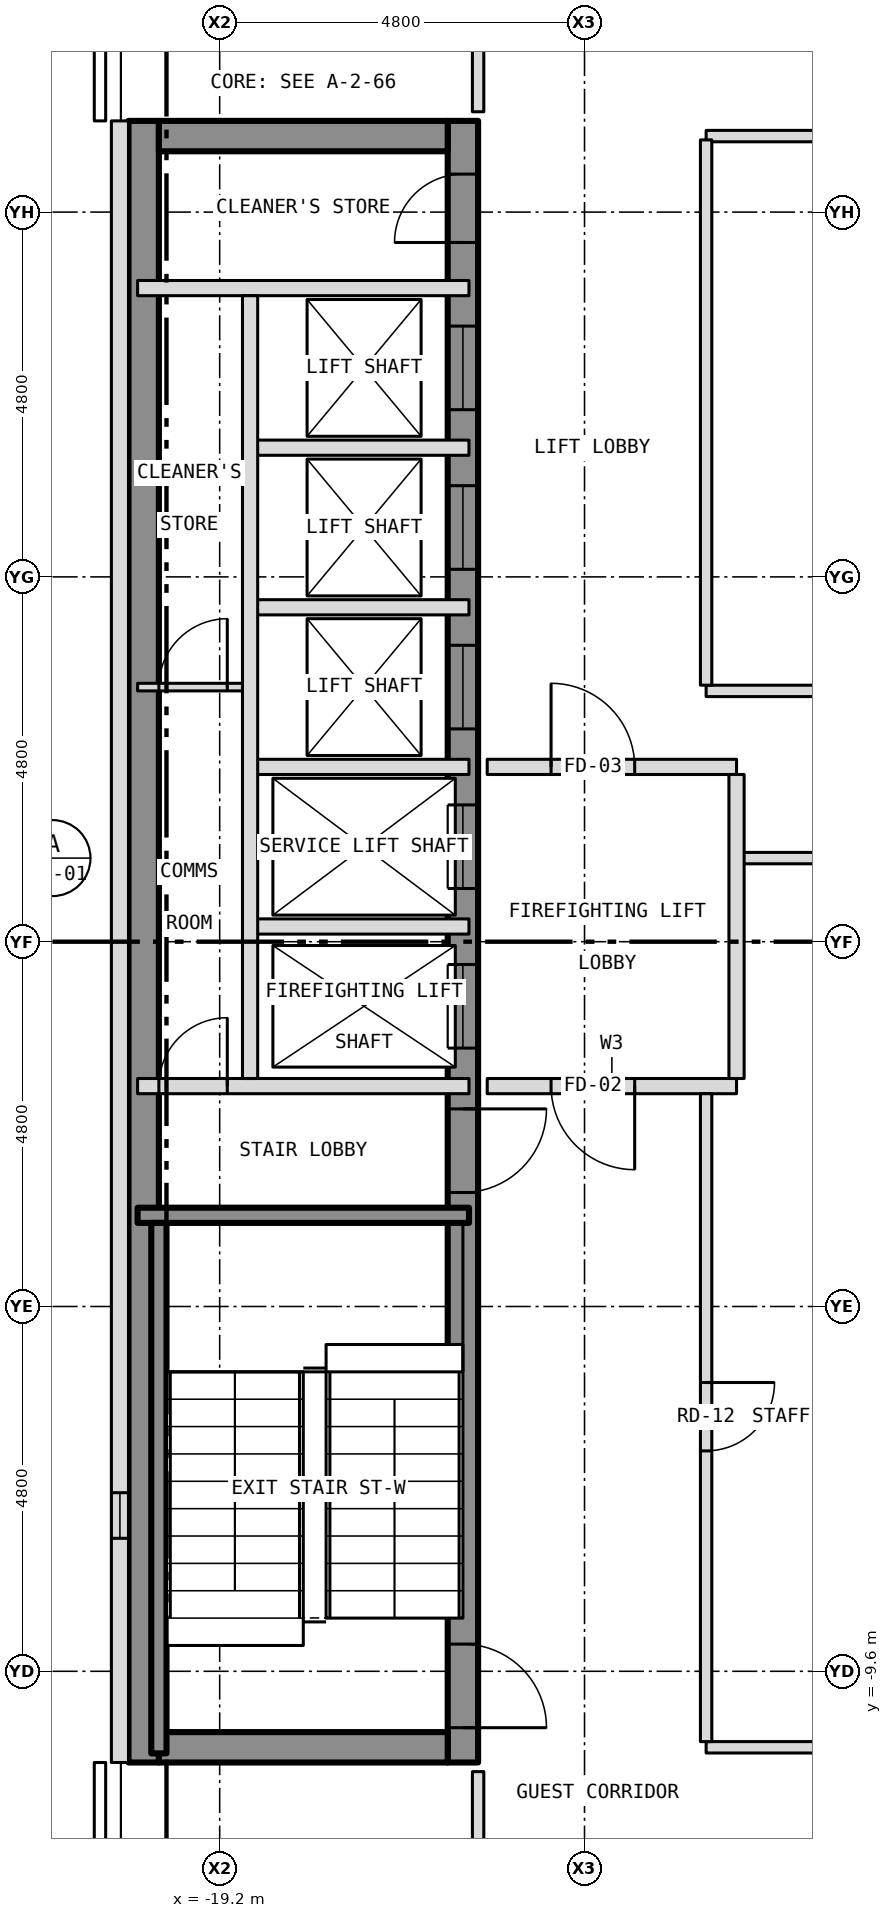
"""IFC4 building model, lengths in metres.
Left out: names, types, materials, properties, quantities, classifications, styles, units other than length and angle.
Written with IfcOpenShell. Run it as: python <this file> out.ifc"""

import sys

from ifc_helpers import new_model, si_unit, direction, frame, frame_2d, origin, place, context, subcontext, project, spatial, rectangle, extrude, element, fill, save


model = new_model("IFC4")
c1 = context("Model", 3, precision=1e-05, world=origin(), true_north=direction((0.0, 1.0)))
c2 = subcontext(c1, "Body", "Model", "MODEL_VIEW")
j1 = project(units=[si_unit("LENGTHUNIT", "METRE"), si_unit("PLANEANGLEUNIT", "RADIAN")], contexts=[c1])
p1 = place(None, origin())
s1 = spatial("IfcSite", under=j1, at=p1, CompositionType="ELEMENT")
p2 = place(p1, origin())
s2 = spatial("IfcBuilding", under=s1, at=p2, CompositionType="ELEMENT")
p3 = place(p2, frame((0.0, 0.0, 241.0)))
s3 = spatial("IfcBuildingStorey", under=s2, at=p3, CompositionType="ELEMENT", Elevation=241.0)
p4 = place(p3, frame((-16.0, -10.8, 0.0), z_axis=(0.0, 0.0, 1.0), x_axis=(0.0, 1.0, 0.0)))
e1 = element("IfcWall", 1, at=p4, inside=s3, PredefinedType="SHEAR", context=c2, shape_type="SweptSolid", body=[
    extrude(rectangle(XDim=21.6, YDim=0.4, at=frame_2d((10.8, 0.0))), origin(), (0.0, 0.0, 1.0), 3.25),
])
p5 = place(p4, frame((9.4, 0.0, 0.0)))
e2 = element("IfcOpeningElement", 2, at=p5, cuts=e1, PredefinedType="OPENING", context=c2, shape_type="SweptSolid", body=[
    extrude(rectangle(XDim=1.1, YDim=2.1, at=frame_2d((0.55, 1.05))), frame((0.0, 0.212, 0.0), z_axis=(0.0, -1.0, 0.0), x_axis=(1.0, 0.0, 0.0)), (0.0, 0.0, 1.0), 0.424),
])
p6 = place(p4, frame((11.5, 0.0, 0.0)))
e3 = element("IfcOpeningElement", 3, at=p6, cuts=e1, PredefinedType="OPENING", context=c2, shape_type="SweptSolid", body=[
    extrude(rectangle(XDim=1.1, YDim=2.1, at=frame_2d((0.55, 1.05))), frame((0.0, 0.212, 0.0), z_axis=(0.0, -1.0, 0.0), x_axis=(1.0, 0.0, 0.0)), (0.0, 0.0, 1.0), 0.424),
])
p7 = place(p4, frame((13.6, 0.0, 0.0)))
e4 = element("IfcOpeningElement", 4, at=p7, cuts=e1, PredefinedType="OPENING", context=c2, shape_type="SweptSolid", body=[
    extrude(rectangle(XDim=1.1, YDim=2.1, at=frame_2d((0.55, 1.05))), frame((0.0, 0.212, 0.0), z_axis=(0.0, -1.0, 0.0), x_axis=(1.0, 0.0, 0.0)), (0.0, 0.0, 1.0), 0.424),
])
p8 = place(p4, frame((15.7, 0.0, 0.0)))
e5 = element("IfcOpeningElement", 5, at=p8, cuts=e1, PredefinedType="OPENING", context=c2, shape_type="SweptSolid", body=[
    extrude(rectangle(XDim=1.1, YDim=2.1, at=frame_2d((0.55, 1.05))), frame((0.0, 0.212, 0.0), z_axis=(0.0, -1.0, 0.0), x_axis=(1.0, 0.0, 0.0)), (0.0, 0.0, 1.0), 0.424),
])
p9 = place(p4, frame((17.8, 0.0, 0.0)))
e6 = element("IfcOpeningElement", 6, at=p9, cuts=e1, PredefinedType="OPENING", context=c2, shape_type="SweptSolid", body=[
    extrude(rectangle(XDim=1.1, YDim=2.1, at=frame_2d((0.55, 1.05))), frame((0.0, 0.212, 0.0), z_axis=(0.0, -1.0, 0.0), x_axis=(1.0, 0.0, 0.0)), (0.0, 0.0, 1.0), 0.424),
])
p10 = place(p4, frame((0.458, 0.0, 0.0)))
e7 = element("IfcOpeningElement", 7, at=p10, cuts=e1, PredefinedType="OPENING", context=c2, shape_type="SweptSolid", body=[
    extrude(rectangle(XDim=1.1, YDim=2.1, at=frame_2d((0.55, 1.05))), frame((0.0, 0.212, 0.0), z_axis=(0.0, -1.0, 0.0), x_axis=(1.0, 0.0, 0.0)), (0.0, 0.0, 1.0), 0.424),
])
p11 = place(p4, frame((7.5, 0.0, 0.0)))
e8 = element("IfcOpeningElement", 8, at=p11, cuts=e1, PredefinedType="OPENING", context=c2, shape_type="SweptSolid", body=[
    extrude(rectangle(XDim=1.1, YDim=2.1, at=frame_2d((0.55, 1.05))), frame((0.0, 0.212, 0.0), z_axis=(0.0, -1.0, 0.0), x_axis=(1.0, 0.0, 0.0)), (0.0, 0.0, 1.0), 0.424),
])
p12 = place(p4, frame((20.0, 0.0, 0.0)))
e9 = element("IfcOpeningElement", 9, at=p12, cuts=e1, PredefinedType="OPENING", context=c2, shape_type="SweptSolid", body=[
    extrude(rectangle(XDim=0.9, YDim=2.1, at=frame_2d((0.45, 1.05))), frame((0.0, 0.212, 0.0), z_axis=(0.0, -1.0, 0.0), x_axis=(1.0, 0.0, 0.0)), (0.0, 0.0, 1.0), 0.424),
])
p13 = place(p3, frame((-20.2, -10.8, 0.0), z_axis=(0.0, 0.0, 1.0), x_axis=(0.0, 1.0, 0.0)))
e10 = element("IfcWall", 10, at=p13, inside=s3, PredefinedType="SHEAR", context=c2, shape_type="SweptSolid", body=[
    extrude(rectangle(XDim=21.6, YDim=0.4, at=frame_2d((10.8, 0.0))), origin(), (0.0, 0.0, 1.0), 3.25),
])
for number, where, z_axis, x_axis in (
    (11, (-20.0, 10.6, 0.0), (0.0, 0.0, 1.0), (1.0, 0.0, 0.0)),
    (12, (-20.0, -10.6, 0.0), (0.0, 0.0, 1.0), (1.0, 0.0, 0.0)),
):
    element("IfcWall", number, at=place(p3, frame(where, z_axis=z_axis, x_axis=x_axis)), inside=s3, PredefinedType="SHEAR", context=c2, shape_type="SweptSolid", body=[
        extrude(rectangle(XDim=3.8, YDim=0.4, at=frame_2d((1.9, 0.0))), origin(), (0.0, 0.0, 1.0), 3.25),
    ])
p14 = place(p3, frame((-20.512, 10.8, 0.0), z_axis=(0.0, 0.0, 1.0), x_axis=(0.0, -1.0, 0.0)))
e13 = element("IfcWall", 13, at=p14, inside=s3, PredefinedType="SOLIDWALL", context=c2, shape_type="SweptSolid", body=[
    extrude(rectangle(XDim=21.6, YDim=0.225, at=frame_2d((10.8, 0.0))), origin(), (0.0, 0.0, 1.0), 3.5),
])
p15 = place(p14, frame((18.05, 0.0, 1.0)))
e14 = element("IfcOpeningElement", 14, at=p15, cuts=e13, PredefinedType="OPENING", context=c2, shape_type="SweptSolid", body=[
    extrude(rectangle(XDim=0.6, YDim=1.5, at=frame_2d((0.3, 0.75))), frame((0.0, 0.125, 0.0), z_axis=(0.0, -1.0, 0.0), x_axis=(1.0, 0.0, 0.0)), (0.0, 0.0, 1.0), 0.249),
])
p16 = place(p3, frame((-12.8, -10.6, 0.0), z_axis=(0.0, 0.0, 1.0), x_axis=(1.0, 0.0, 0.0)))
e15 = element("IfcWall", 15, at=p16, inside=s3, PredefinedType="PARTITIONING", context=c2, shape_type="SweptSolid", body=[
    extrude(rectangle(XDim=20.3, YDim=0.15, at=frame_2d((10.15, 0.0))), origin(), (0.0, 0.0, 1.0), 3.35),
])
p17 = place(p16, frame((11.3, 0.0, 0.0)))
e16 = element("IfcOpeningElement", 16, at=p17, cuts=e15, PredefinedType="OPENING", context=c2, shape_type="SweptSolid", body=[
    extrude(rectangle(XDim=0.9, YDim=2.1, at=frame_2d((0.45, 1.05))), frame((0.0, 0.087, 0.0), z_axis=(0.0, -1.0, 0.0), x_axis=(1.0, 0.0, 0.0)), (0.0, 0.0, 1.0), 0.174),
])
p18 = place(p3, frame((-20.28, -3.6, 0.0), z_axis=(0.0, 0.0, 1.0), x_axis=(1.0, 0.0, 0.0)))
e17 = element("IfcWall", 17, at=p18, inside=s3, PredefinedType="SHEAR", context=c2, shape_type="SweptSolid", body=[
    extrude(rectangle(XDim=4.36, YDim=0.2, at=frame_2d((2.18, 0.0))), origin(), (0.0, 0.0, 1.0), 3.25),
])
p19 = place(p3, frame((-20.28, -1.9, 0.0), z_axis=(0.0, 0.0, 1.0), x_axis=(1.0, 0.0, 0.0)))
e18 = element("IfcWall", 18, at=p19, inside=s3, PredefinedType="PARTITIONING", context=c2, shape_type="SweptSolid", body=[
    extrude(rectangle(XDim=4.36, YDim=0.2, at=frame_2d((2.18, 0.0))), origin(), (0.0, 0.0, 1.0), 3.25),
])
p20 = place(p19, frame((0.28, 0.0, 0.0)))
e19 = element("IfcOpeningElement", 19, at=p20, cuts=e18, PredefinedType="OPENING", context=c2, shape_type="SweptSolid", body=[
    extrude(rectangle(XDim=0.9, YDim=2.1, at=frame_2d((0.45, 1.05))), frame((0.0, 0.112, 0.0), z_axis=(0.0, -1.0, 0.0), x_axis=(1.0, 0.0, 0.0)), (0.0, 0.0, 1.0), 0.224),
])
p21 = place(p3, frame((-15.68, -1.9, 0.0), z_axis=(0.0, 0.0, 1.0), x_axis=(1.0, 0.0, 0.0)))
e20 = element("IfcWall", 20, at=p21, inside=s3, PredefinedType="PARTITIONING", context=c2, shape_type="SweptSolid", body=[
    extrude(rectangle(XDim=3.28, YDim=0.2, at=frame_2d((1.64, 0.0))), origin(), (0.0, 0.0, 1.0), 3.35),
])
p22 = place(p21, frame((0.84, 0.0, 0.0)))
e21 = element("IfcOpeningElement", 21, at=p22, cuts=e20, PredefinedType="OPENING", context=c2, shape_type="SweptSolid", body=[
    extrude(rectangle(XDim=1.1, YDim=2.1, at=frame_2d((0.55, 1.05))), frame((0.0, 0.112, 0.0), z_axis=(0.0, -1.0, 0.0), x_axis=(1.0, 0.0, 0.0)), (0.0, 0.0, 1.0), 0.224),
])
p23 = place(p3, frame((-18.8, 0.2, 0.0), z_axis=(0.0, 0.0, 1.0), x_axis=(1.0, 0.0, 0.0)))
e22 = element("IfcWall", 22, at=p23, inside=s3, PredefinedType="PARTITIONING", context=c2, shape_type="SweptSolid", body=[
    extrude(rectangle(XDim=2.88, YDim=0.2, at=frame_2d((1.44, 0.0))), origin(), (0.0, 0.0, 1.0), 3.25),
])
p24 = place(p3, frame((-12.4, 1.1, 0.0), z_axis=(0.0, 0.0, 1.0), x_axis=(1.0, 0.0, 0.0)))
e23 = element("IfcWall", 23, at=p24, inside=s3, PredefinedType="PARTITIONING", context=c2, shape_type="SweptSolid", body=[
    extrude(rectangle(XDim=19.9, YDim=0.15, at=frame_2d((9.95, 0.0))), origin(), (0.0, 0.0, 1.0), 3.35),
])
p25 = place(p3, frame((-18.8, 2.3, 0.0), z_axis=(0.0, 0.0, 1.0), x_axis=(1.0, 0.0, 0.0)))
e24 = element("IfcWall", 24, at=p25, inside=s3, PredefinedType="PARTITIONING", context=c2, shape_type="SweptSolid", body=[
    extrude(rectangle(XDim=2.88, YDim=0.2, at=frame_2d((1.44, 0.0))), origin(), (0.0, 0.0, 1.0), 3.25),
])
p26 = place(p3, frame((-15.68, 2.3, 0.0), z_axis=(0.0, 0.0, 1.0), x_axis=(1.0, 0.0, 0.0)))
e25 = element("IfcWall", 25, at=p26, inside=s3, PredefinedType="PARTITIONING", context=c2, shape_type="SweptSolid", body=[
    extrude(rectangle(XDim=3.28, YDim=0.2, at=frame_2d((1.64, 0.0))), origin(), (0.0, 0.0, 1.0), 3.35),
])
p27 = place(p26, frame((0.84, 0.0, 0.0)))
e26 = element("IfcOpeningElement", 26, at=p27, cuts=e25, PredefinedType="OPENING", context=c2, shape_type="SweptSolid", body=[
    extrude(rectangle(XDim=1.1, YDim=2.1, at=frame_2d((0.55, 1.05))), frame((0.0, 0.112, 0.0), z_axis=(0.0, -1.0, 0.0), x_axis=(1.0, 0.0, 0.0)), (0.0, 0.0, 1.0), 0.224),
])
p28 = place(p3, frame((-12.8, 3.3, 0.0), z_axis=(0.0, 0.0, 1.0), x_axis=(1.0, 0.0, 0.0)))
e27 = element("IfcWall", 27, at=p28, inside=s3, PredefinedType="PARTITIONING", context=c2, shape_type="SweptSolid", body=[
    extrude(rectangle(XDim=20.3, YDim=0.15, at=frame_2d((10.15, 0.0))), origin(), (0.0, 0.0, 1.0), 3.35),
])
p29 = place(p28, frame((16.1, 0.0, 0.0)))
e28 = element("IfcOpeningElement", 28, at=p29, cuts=e27, PredefinedType="OPENING", context=c2, shape_type="SweptSolid", body=[
    extrude(rectangle(XDim=0.9, YDim=2.1, at=frame_2d((0.45, 1.05))), frame((0.0, 0.087, 0.0), z_axis=(0.0, -1.0, 0.0), x_axis=(1.0, 0.0, 0.0)), (0.0, 0.0, 1.0), 0.174),
])
p30 = place(p3, frame((-20.28, 3.35, 0.0), z_axis=(0.0, 0.0, 1.0), x_axis=(1.0, 0.0, 0.0)))
e29 = element("IfcWall", 29, at=p30, inside=s3, PredefinedType="PARTITIONING", context=c2, shape_type="SweptSolid", body=[
    extrude(rectangle(XDim=1.48, YDim=0.1, at=frame_2d((0.74, 0.0))), origin(), (0.0, 0.0, 1.0), 3.25),
])
p31 = place(p30, frame((0.28, 0.0, 0.0)))
e30 = element("IfcOpeningElement", 30, at=p31, cuts=e29, PredefinedType="OPENING", context=c2, shape_type="SweptSolid", body=[
    extrude(rectangle(XDim=0.9, YDim=2.1, at=frame_2d((0.45, 1.05))), frame((0.0, 0.062, 0.0), z_axis=(0.0, -1.0, 0.0), x_axis=(1.0, 0.0, 0.0)), (0.0, 0.0, 1.0), 0.124),
])
for number, where, z_axis, x_axis in (
    (31, (-18.8, 4.4, 0.0), (0.0, 0.0, 1.0), (1.0, 0.0, 0.0)),
    (32, (-18.8, 6.5, 0.0), (0.0, 0.0, 1.0), (1.0, 0.0, 0.0)),
):
    element("IfcWall", number, at=place(p3, frame(where, z_axis=z_axis, x_axis=x_axis)), inside=s3, PredefinedType="PARTITIONING", context=c2, shape_type="SweptSolid", body=[
        extrude(rectangle(XDim=2.88, YDim=0.2, at=frame_2d((1.44, 0.0))), origin(), (0.0, 0.0, 1.0), 3.25),
    ])
p32 = place(p3, frame((-20.28, 8.6, 0.0), z_axis=(0.0, 0.0, 1.0), x_axis=(1.0, 0.0, 0.0)))
e33 = element("IfcWall", 33, at=p32, inside=s3, PredefinedType="PARTITIONING", context=c2, shape_type="SweptSolid", body=[
    extrude(rectangle(XDim=4.36, YDim=0.2, at=frame_2d((2.18, 0.0))), origin(), (0.0, 0.0, 1.0), 3.25),
])
p33 = place(p3, frame((-12.8, 10.6, 0.0), z_axis=(0.0, 0.0, 1.0), x_axis=(1.0, 0.0, 0.0)))
e34 = element("IfcWall", 34, at=p33, inside=s3, PredefinedType="PARTITIONING", context=c2, shape_type="SweptSolid", body=[
    extrude(rectangle(XDim=20.3, YDim=0.15, at=frame_2d((10.15, 0.0))), origin(), (0.0, 0.0, 1.0), 3.35),
])
p34 = place(p33, frame((5.95, 0.0, 0.0)))
e35 = element("IfcOpeningElement", 35, at=p34, cuts=e34, PredefinedType="OPENING", context=c2, shape_type="SweptSolid", body=[
    extrude(rectangle(XDim=0.9, YDim=2.1, at=frame_2d((0.45, 1.05))), frame((0.0, 0.087, 0.0), z_axis=(0.0, -1.0, 0.0), x_axis=(1.0, 0.0, 0.0)), (0.0, 0.0, 1.0), 0.174),
])
p35 = place(p3, frame((-20.0, -10.68, 0.0), z_axis=(0.0, 0.0, 1.0), x_axis=(0.0, 1.0, 0.0)))
e36 = element("IfcWall", 36, at=p35, inside=s3, PredefinedType="SHEAR", context=c2, shape_type="SweptSolid", body=[
    extrude(rectangle(XDim=6.98, YDim=0.2, at=frame_2d((3.49, 0.0))), origin(), (0.0, 0.0, 1.0), 3.25),
])
p36 = place(p3, frame((-18.8, -1.8, 0.0), z_axis=(0.0, 0.0, 1.0), x_axis=(0.0, 1.0, 0.0)))
e37 = element("IfcWall", 37, at=p36, inside=s3, PredefinedType="PARTITIONING", context=c2, shape_type="SweptSolid", body=[
    extrude(rectangle(XDim=10.3, YDim=0.2, at=frame_2d((5.15, 0.0))), origin(), (0.0, 0.0, 1.0), 3.25),
])
for number, where, z_axis, x_axis in (
    (38, (-15.8, -12.725, 0.0), (0.0, 0.0, 1.0), (0.0, 1.0, 0.0)),
    (39, (-15.8, 10.92, 0.0), (0.0, 0.0, 1.0), (0.0, 1.0, 0.0)),
):
    element("IfcWall", number, at=place(p3, frame(where, z_axis=z_axis, x_axis=x_axis)), inside=s3, PredefinedType="PARTITIONING", context=c2, shape_type="SweptSolid", body=[
        extrude(rectangle(XDim=1.805, YDim=0.15, at=frame_2d((0.903, 0.0))), origin(), (0.0, 0.0, 1.0), 3.35),
    ])
p37 = place(p3, frame((-12.8, -10.525, 0.0), z_axis=(0.0, 0.0, 1.0), x_axis=(0.0, 1.0, 0.0)))
e40 = element("IfcWall", 40, at=p37, inside=s3, PredefinedType="PARTITIONING", context=c2, shape_type="SweptSolid", body=[
    extrude(rectangle(XDim=8.525, YDim=0.15, at=frame_2d((4.262, 0.0))), origin(), (0.0, 0.0, 1.0), 3.35),
])
p38 = place(p37, frame((3.825, 0.0, 0.0)))
e41 = element("IfcOpeningElement", 41, at=p38, cuts=e40, PredefinedType="OPENING", context=c2, shape_type="SweptSolid", body=[
    extrude(rectangle(XDim=0.9, YDim=2.1, at=frame_2d((0.45, 1.05))), frame((0.0, 0.087, 0.0), z_axis=(0.0, -1.0, 0.0), x_axis=(1.0, 0.0, 0.0)), (0.0, 0.0, 1.0), 0.174),
])
p39 = place(p3, frame((-12.8, 3.375, 0.0), z_axis=(0.0, 0.0, 1.0), x_axis=(0.0, 1.0, 0.0)))
e42 = element("IfcWall", 42, at=p39, inside=s3, PredefinedType="PARTITIONING", context=c2, shape_type="SweptSolid", body=[
    extrude(rectangle(XDim=7.175, YDim=0.15, at=frame_2d((3.587, 0.0))), origin(), (0.0, 0.0, 1.0), 3.35),
])
p40 = place(p3, frame((-12.4, -1.8, 0.0), z_axis=(0.0, 0.0, 1.0), x_axis=(0.0, 1.0, 0.0)))
e43 = element("IfcWall", 43, at=p40, inside=s3, PredefinedType="PARTITIONING", context=c2, shape_type="SweptSolid", body=[
    extrude(rectangle(XDim=4.0, YDim=0.2, at=frame_2d((2.0, 0.0))), origin(), (0.0, 0.0, 1.0), 3.35),
])
p41 = place(p15, origin())
e44 = element("IfcWindow", 44, at=p41, inside=s3, PartitioningType="SINGLE_PANEL", PredefinedType="WINDOW", context=c2, shape_type="SweptSolid", body=[
    extrude(rectangle(XDim=0.6, YDim=1.5, at=frame_2d((0.3, 0.75))), frame((0.0, -0.022, 0.0), z_axis=(0.0, -1.0, 0.0), x_axis=(1.0, 0.0, 0.0)), (0.0, 0.0, 1.0), 0.06),
])
fill(e14, e44)
p42 = place(p5, origin())
e45 = element("IfcDoor", 45, at=p42, inside=s3, OperationType="SLIDING_TO_LEFT", PredefinedType="DOOR", context=c2, shape_type="SweptSolid", body=[
    extrude(rectangle(XDim=1.1, YDim=2.1, at=frame_2d((0.55, 1.05))), frame((0.0, 0.025, 0.0), z_axis=(0.0, -1.0, 0.0), x_axis=(1.0, 0.0, 0.0)), (0.0, 0.0, 1.0), 0.05),
])
fill(e2, e45)
p43 = place(p6, origin())
e46 = element("IfcDoor", 46, at=p43, inside=s3, OperationType="SLIDING_TO_LEFT", PredefinedType="DOOR", context=c2, shape_type="SweptSolid", body=[
    extrude(rectangle(XDim=1.1, YDim=2.1, at=frame_2d((0.55, 1.05))), frame((0.0, 0.025, 0.0), z_axis=(0.0, -1.0, 0.0), x_axis=(1.0, 0.0, 0.0)), (0.0, 0.0, 1.0), 0.05),
])
fill(e3, e46)
p44 = place(p7, origin())
e47 = element("IfcDoor", 47, at=p44, inside=s3, OperationType="SLIDING_TO_LEFT", PredefinedType="DOOR", context=c2, shape_type="SweptSolid", body=[
    extrude(rectangle(XDim=1.1, YDim=2.1, at=frame_2d((0.55, 1.05))), frame((0.0, 0.025, 0.0), z_axis=(0.0, -1.0, 0.0), x_axis=(1.0, 0.0, 0.0)), (0.0, 0.0, 1.0), 0.05),
])
fill(e4, e47)
p45 = place(p8, origin())
e48 = element("IfcDoor", 48, at=p45, inside=s3, OperationType="SLIDING_TO_LEFT", PredefinedType="DOOR", context=c2, shape_type="SweptSolid", body=[
    extrude(rectangle(XDim=1.1, YDim=2.1, at=frame_2d((0.55, 1.05))), frame((0.0, 0.025, 0.0), z_axis=(0.0, -1.0, 0.0), x_axis=(1.0, 0.0, 0.0)), (0.0, 0.0, 1.0), 0.05),
])
fill(e5, e48)
p46 = place(p9, origin())
e49 = element("IfcDoor", 49, at=p46, inside=s3, OperationType="SLIDING_TO_LEFT", PredefinedType="DOOR", context=c2, shape_type="SweptSolid", body=[
    extrude(rectangle(XDim=1.1, YDim=2.1, at=frame_2d((0.55, 1.05))), frame((0.0, 0.025, 0.0), z_axis=(0.0, -1.0, 0.0), x_axis=(1.0, 0.0, 0.0)), (0.0, 0.0, 1.0), 0.05),
])
fill(e6, e49)
p47 = place(p10, origin())
e50 = element("IfcDoor", 50, at=p47, inside=s3, OperationType="SINGLE_SWING_LEFT", PredefinedType="DOOR", context=c2, shape_type="SweptSolid", body=[
    extrude(rectangle(XDim=1.1, YDim=2.1, at=frame_2d((0.55, 1.05))), frame((0.0, 0.025, 0.0), z_axis=(0.0, -1.0, 0.0), x_axis=(1.0, 0.0, 0.0)), (0.0, 0.0, 1.0), 0.05),
])
fill(e7, e50)
p48 = place(p11, origin())
e51 = element("IfcDoor", 51, at=p48, inside=s3, OperationType="SINGLE_SWING_RIGHT", PredefinedType="DOOR", context=c2, shape_type="SweptSolid", body=[
    extrude(rectangle(XDim=1.1, YDim=2.1, at=frame_2d((0.55, 1.05))), frame((0.0, 0.025, 0.0), z_axis=(0.0, -1.0, 0.0), x_axis=(1.0, 0.0, 0.0)), (0.0, 0.0, 1.0), 0.05),
])
fill(e8, e51)
p49 = place(p12, origin())
e52 = element("IfcDoor", 52, at=p49, inside=s3, OperationType="SINGLE_SWING_LEFT", PredefinedType="DOOR", context=c2, shape_type="SweptSolid", body=[
    extrude(rectangle(XDim=0.9, YDim=2.1, at=frame_2d((0.45, 1.05))), frame((0.0, 0.025, 0.0), z_axis=(0.0, -1.0, 0.0), x_axis=(1.0, 0.0, 0.0)), (0.0, 0.0, 1.0), 0.05),
])
fill(e9, e52)
p50 = place(p20, origin())
e53 = element("IfcDoor", 53, at=p50, inside=s3, OperationType="SINGLE_SWING_RIGHT", PredefinedType="DOOR", context=c2, shape_type="SweptSolid", body=[
    extrude(rectangle(XDim=0.9, YDim=2.1, at=frame_2d((0.45, 1.05))), frame((0.0, 0.025, 0.0), z_axis=(0.0, -1.0, 0.0), x_axis=(1.0, 0.0, 0.0)), (0.0, 0.0, 1.0), 0.05),
])
fill(e19, e53)
p51 = place(p31, origin())
e54 = element("IfcDoor", 54, at=p51, inside=s3, OperationType="SINGLE_SWING_RIGHT", PredefinedType="DOOR", context=c2, shape_type="SweptSolid", body=[
    extrude(rectangle(XDim=0.9, YDim=2.1, at=frame_2d((0.45, 1.05))), frame((0.0, 0.025, 0.0), z_axis=(0.0, -1.0, 0.0), x_axis=(1.0, 0.0, 0.0)), (0.0, 0.0, 1.0), 0.05),
])
fill(e30, e54)
p52 = place(p22, origin())
e55 = element("IfcDoor", 55, at=p52, inside=s3, OperationType="SINGLE_SWING_RIGHT", PredefinedType="DOOR", context=c2, shape_type="SweptSolid", body=[
    extrude(rectangle(XDim=1.1, YDim=2.1, at=frame_2d((0.55, 1.05))), frame((0.0, 0.025, 0.0), z_axis=(0.0, -1.0, 0.0), x_axis=(1.0, 0.0, 0.0)), (0.0, 0.0, 1.0), 0.05),
])
fill(e21, e55)
p53 = place(p27, origin())
e56 = element("IfcDoor", 56, at=p53, inside=s3, OperationType="SINGLE_SWING_LEFT", PredefinedType="DOOR", context=c2, shape_type="SweptSolid", body=[
    extrude(rectangle(XDim=1.1, YDim=2.1, at=frame_2d((0.55, 1.05))), frame((0.0, 0.025, 0.0), z_axis=(0.0, -1.0, 0.0), x_axis=(1.0, 0.0, 0.0)), (0.0, 0.0, 1.0), 0.05),
])
fill(e26, e56)
p54 = place(p38, origin())
e57 = element("IfcDoor", 57, at=p54, inside=s3, OperationType="SINGLE_SWING_RIGHT", PredefinedType="DOOR", context=c2, shape_type="SweptSolid", body=[
    extrude(rectangle(XDim=0.9, YDim=2.1, at=frame_2d((0.45, 1.05))), frame((0.0, 0.025, 0.0), z_axis=(0.0, -1.0, 0.0), x_axis=(1.0, 0.0, 0.0)), (0.0, 0.0, 1.0), 0.05),
])
fill(e41, e57)
save(model, sys.argv[1])
